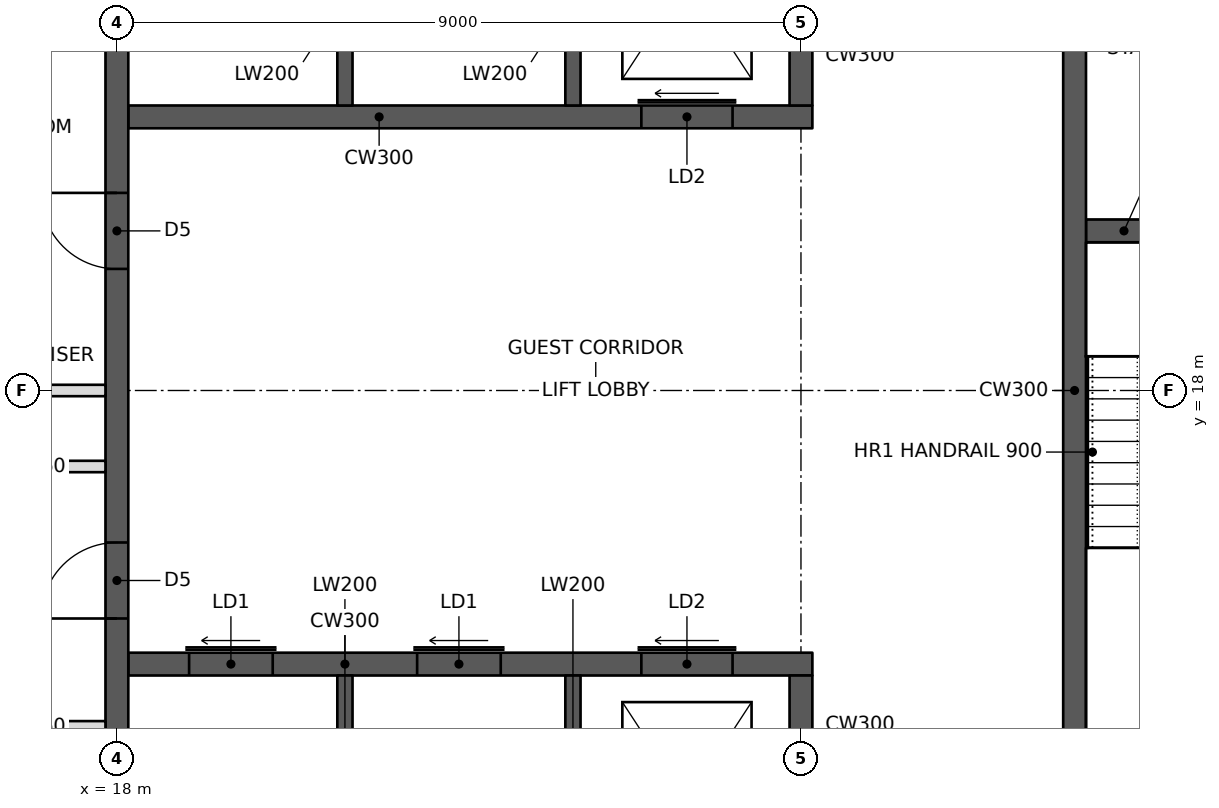
"""IFC4 building model, lengths in metres.
Left out: names, types, materials, properties, quantities, classifications, styles, units other than length and angle.
Written with IfcOpenShell. Run it as: python <this file> out.ifc"""

import sys

from ifc_helpers import new_model, si_unit, direction, frame, frame_2d, origin, place, context, subcontext, project, spatial, rectangle, extrude, element, fill, save


model = new_model("IFC4")
c1 = context("Model", 3, precision=1e-05, world=origin(), true_north=direction((0.0, 1.0)))
c2 = subcontext(c1, "Body", "Model", "MODEL_VIEW")
j1 = project(units=[si_unit("LENGTHUNIT", "METRE"), si_unit("PLANEANGLEUNIT", "RADIAN")], contexts=[c1])
p1 = place(None, origin())
s1 = spatial("IfcSite", under=j1, at=p1, CompositionType="ELEMENT")
p2 = place(p1, origin())
s2 = spatial("IfcBuilding", under=s1, at=p2, CompositionType="ELEMENT")
p3 = place(p2, frame((0.0, 0.0, 148.6)))
s3 = spatial("IfcBuildingStorey", under=s2, at=p3, CompositionType="ELEMENT", Elevation=148.6)
p4 = place(p3, frame((18.0, 11.4, 0.0), z_axis=(0.0, 0.0, 1.0), x_axis=(0.0, 1.0, 0.0)))
e1 = element("IfcWall", 1, at=p4, inside=s3, PredefinedType="SHEAR", context=c2, shape_type="SweptSolid", body=[
    extrude(rectangle(XDim=13.2, YDim=0.3, at=frame_2d((6.6, 0.0))), origin(), (0.0, 0.0, 1.0), 3.4),
])
p5 = place(p4, frame((3.6, 0.0, 0.0)))
e2 = element("IfcOpeningElement", 2, at=p5, cuts=e1, PredefinedType="OPENING", context=c2, shape_type="SweptSolid", body=[
    extrude(rectangle(XDim=1.0, YDim=2.1, at=frame_2d((0.5, 1.05))), frame((0.0, 0.16, 0.0), z_axis=(0.0, -1.0, 0.0), x_axis=(1.0, 0.0, 0.0)), (0.0, 0.0, 1.0), 0.32),
])
p6 = place(p4, frame((8.2, 0.0, 0.0)))
e3 = element("IfcOpeningElement", 3, at=p6, cuts=e1, PredefinedType="OPENING", context=c2, shape_type="SweptSolid", body=[
    extrude(rectangle(XDim=1.0, YDim=2.1, at=frame_2d((0.5, 1.05))), frame((0.0, 0.16, 0.0), z_axis=(0.0, -1.0, 0.0), x_axis=(1.0, 0.0, 0.0)), (0.0, 0.0, 1.0), 0.32),
])
p7 = place(p3, frame((14.55, 18.0, 0.0), z_axis=(0.0, 0.0, 1.0), x_axis=(1.0, 0.0, 0.0)))
e4 = element("IfcWall", 4, at=p7, inside=s3, PredefinedType="PARTITIONING", context=c2, shape_type="SweptSolid", body=[
    extrude(rectangle(XDim=3.3, YDim=0.15, at=frame_2d((1.65, 0.0))), origin(), (0.0, 0.0, 1.0), 3.2),
])
p8 = place(p3, frame((18.15, 14.4, 0.0), z_axis=(0.0, 0.0, 1.0), x_axis=(1.0, 0.0, 0.0)))
e5 = element("IfcWall", 5, at=p8, inside=s3, PredefinedType="SHEAR", context=c2, shape_type="SweptSolid", body=[
    extrude(rectangle(XDim=9.0, YDim=0.3, at=frame_2d((4.5, 0.0))), origin(), (0.0, 0.0, 1.0), 3.4),
])
p9 = place(p8, frame((0.8, 0.0, 0.0)))
e6 = element("IfcOpeningElement", 6, at=p9, cuts=e5, PredefinedType="OPENING", context=c2, shape_type="SweptSolid", body=[
    extrude(rectangle(XDim=1.1, YDim=2.1, at=frame_2d((0.55, 1.05))), frame((0.0, 0.16, 0.0), z_axis=(0.0, -1.0, 0.0), x_axis=(1.0, 0.0, 0.0)), (0.0, 0.0, 1.0), 0.32),
])
p10 = place(p8, frame((3.8, 0.0, 0.0)))
e7 = element("IfcOpeningElement", 7, at=p10, cuts=e5, PredefinedType="OPENING", context=c2, shape_type="SweptSolid", body=[
    extrude(rectangle(XDim=1.1, YDim=2.1, at=frame_2d((0.55, 1.05))), frame((0.0, 0.16, 0.0), z_axis=(0.0, -1.0, 0.0), x_axis=(1.0, 0.0, 0.0)), (0.0, 0.0, 1.0), 0.32),
])
p11 = place(p8, frame((6.75, 0.0, 0.0)))
e8 = element("IfcOpeningElement", 8, at=p11, cuts=e5, PredefinedType="OPENING", context=c2, shape_type="SweptSolid", body=[
    extrude(rectangle(XDim=1.2, YDim=2.1, at=frame_2d((0.6, 1.05))), frame((0.0, 0.16, 0.0), z_axis=(0.0, -1.0, 0.0), x_axis=(1.0, 0.0, 0.0)), (0.0, 0.0, 1.0), 0.32),
])
p12 = place(p3, frame((27.0, 11.4, 0.0), z_axis=(0.0, 0.0, 1.0), x_axis=(0.0, 1.0, 0.0)))
e9 = element("IfcWall", 9, at=p12, inside=s3, PredefinedType="SHEAR", context=c2, shape_type="SweptSolid", body=[
    extrude(rectangle(XDim=2.85, YDim=0.3, at=frame_2d((1.425, 0.0))), origin(), (0.0, 0.0, 1.0), 3.4),
])
for number, where, z_axis, x_axis in (
    (10, (21.0, 11.4, 0.0), (0.0, 0.0, 1.0), (0.0, 1.0, 0.0)),
    (11, (24.0, 11.4, 0.0), (0.0, 0.0, 1.0), (0.0, 1.0, 0.0)),
):
    element("IfcWall", number, at=place(p3, frame(where, z_axis=z_axis, x_axis=x_axis)), inside=s3, PredefinedType="SHEAR", context=c2, shape_type="SweptSolid", body=[
        extrude(rectangle(XDim=2.85, YDim=0.2, at=frame_2d((1.425, 0.0))), origin(), (0.0, 0.0, 1.0), 3.4),
    ])
p13 = place(p3, frame((18.15, 21.6, 0.0), z_axis=(0.0, 0.0, 1.0), x_axis=(1.0, 0.0, 0.0)))
e12 = element("IfcWall", 12, at=p13, inside=s3, PredefinedType="SHEAR", context=c2, shape_type="SweptSolid", body=[
    extrude(rectangle(XDim=9.0, YDim=0.3, at=frame_2d((4.5, 0.0))), origin(), (0.0, 0.0, 1.0), 3.4),
])
p14 = place(p13, frame((6.75, 0.0, 0.0)))
e13 = element("IfcOpeningElement", 13, at=p14, cuts=e12, PredefinedType="OPENING", context=c2, shape_type="SweptSolid", body=[
    extrude(rectangle(XDim=1.2, YDim=2.1, at=frame_2d((0.6, 1.05))), frame((0.0, 0.16, 0.0), z_axis=(0.0, -1.0, 0.0), x_axis=(1.0, 0.0, 0.0)), (0.0, 0.0, 1.0), 0.32),
])
p15 = place(p3, frame((27.0, 21.75, 0.0), z_axis=(0.0, 0.0, 1.0), x_axis=(0.0, 1.0, 0.0)))
e14 = element("IfcWall", 14, at=p15, inside=s3, PredefinedType="SHEAR", context=c2, shape_type="SweptSolid", body=[
    extrude(rectangle(XDim=2.85, YDim=0.3, at=frame_2d((1.425, 0.0))), origin(), (0.0, 0.0, 1.0), 3.4),
])
for number, where, z_axis, x_axis in (
    (15, (21.0, 21.75, 0.0), (0.0, 0.0, 1.0), (0.0, 1.0, 0.0)),
    (16, (24.0, 21.75, 0.0), (0.0, 0.0, 1.0), (0.0, 1.0, 0.0)),
):
    element("IfcWall", number, at=place(p3, frame(where, z_axis=z_axis, x_axis=x_axis)), inside=s3, PredefinedType="SHEAR", context=c2, shape_type="SweptSolid", body=[
        extrude(rectangle(XDim=2.85, YDim=0.2, at=frame_2d((1.425, 0.0))), origin(), (0.0, 0.0, 1.0), 3.4),
    ])
p16 = place(p3, frame((30.6, 11.4, 0.0), z_axis=(0.0, 0.0, 1.0), x_axis=(0.0, 1.0, 0.0)))
e17 = element("IfcWall", 17, at=p16, inside=s3, PredefinedType="SHEAR", context=c2, shape_type="SweptSolid", body=[
    extrude(rectangle(XDim=13.2, YDim=0.3, at=frame_2d((6.6, 0.0))), origin(), (0.0, 0.0, 1.0), 3.4),
])
p17 = place(p3, frame((30.75, 20.1, 0.0), z_axis=(0.0, 0.0, 1.0), x_axis=(1.0, 0.0, 0.0)))
e18 = element("IfcWall", 18, at=p17, inside=s3, PredefinedType="SHEAR", context=c2, shape_type="SweptSolid", body=[
    extrude(rectangle(XDim=2.85, YDim=0.3, at=frame_2d((1.425, 0.0))), origin(), (0.0, 0.0, 1.0), 3.4),
])
p18 = place(p17, frame((1.15, 0.0, 0.0)))
e19 = element("IfcOpeningElement", 19, at=p18, cuts=e18, PredefinedType="OPENING", context=c2, shape_type="SweptSolid", body=[
    extrude(rectangle(XDim=1.0, YDim=2.1, at=frame_2d((0.5, 1.05))), frame((0.0, 0.16, 0.0), z_axis=(0.0, -1.0, 0.0), x_axis=(1.0, 0.0, 0.0)), (0.0, 0.0, 1.0), 0.32),
])
p19 = place(p3, frame((14.55, 17.0, 0.0), z_axis=(0.0, 0.0, 1.0), x_axis=(1.0, 0.0, 0.0)))
e20 = element("IfcWall", 20, at=p19, inside=s3, PredefinedType="PARTITIONING", context=c2, shape_type="SweptSolid", body=[
    extrude(rectangle(XDim=3.3, YDim=0.15, at=frame_2d((1.65, 0.0))), origin(), (0.0, 0.0, 1.0), 3.2),
])
p20 = place(p19, frame((0.3, 0.0, 0.0)))
e21 = element("IfcOpeningElement", 21, at=p20, cuts=e20, PredefinedType="OPENING", context=c2, shape_type="SweptSolid", body=[
    extrude(rectangle(XDim=1.0, YDim=2.1, at=frame_2d((0.5, 1.05))), frame((0.0, 0.085, 0.0), z_axis=(0.0, -1.0, 0.0), x_axis=(1.0, 0.0, 0.0)), (0.0, 0.0, 1.0), 0.17),
])
p21 = place(p3, frame((14.55, 13.575, 0.0), z_axis=(0.0, 0.0, 1.0), x_axis=(1.0, 0.0, 0.0)))
e22 = element("IfcWall", 22, at=p21, inside=s3, PredefinedType="PARTITIONING", context=c2, shape_type="SweptSolid", body=[
    extrude(rectangle(XDim=3.3, YDim=0.15, at=frame_2d((1.65, 0.0))), origin(), (0.0, 0.0, 1.0), 3.2),
])
p22 = place(p21, frame((0.3, 0.0, 0.0)))
e23 = element("IfcOpeningElement", 23, at=p22, cuts=e22, PredefinedType="OPENING", context=c2, shape_type="SweptSolid", body=[
    extrude(rectangle(XDim=1.0, YDim=2.1, at=frame_2d((0.5, 1.05))), frame((0.0, 0.085, 0.0), z_axis=(0.0, -1.0, 0.0), x_axis=(1.0, 0.0, 0.0)), (0.0, 0.0, 1.0), 0.17),
])
p23 = place(p5, origin())
e24 = element("IfcDoor", 24, at=p23, inside=s3, OperationType="SINGLE_SWING_LEFT", PredefinedType="DOOR", context=c2, shape_type="SweptSolid", body=[
    extrude(rectangle(XDim=1.0, YDim=2.1, at=frame_2d((0.5, 1.05))), frame((0.0, 0.025, 0.0), z_axis=(0.0, -1.0, 0.0), x_axis=(1.0, 0.0, 0.0)), (0.0, 0.0, 1.0), 0.05),
])
fill(e2, e24)
p24 = place(p6, origin())
e25 = element("IfcDoor", 25, at=p24, inside=s3, OperationType="SINGLE_SWING_RIGHT", PredefinedType="DOOR", context=c2, shape_type="SweptSolid", body=[
    extrude(rectangle(XDim=1.0, YDim=2.1, at=frame_2d((0.5, 1.05))), frame((0.0, 0.025, 0.0), z_axis=(0.0, -1.0, 0.0), x_axis=(1.0, 0.0, 0.0)), (0.0, 0.0, 1.0), 0.05),
])
fill(e3, e25)
p25 = place(p9, origin())
e26 = element("IfcDoor", 26, at=p25, inside=s3, OperationType="SLIDING_TO_LEFT", PredefinedType="DOOR", context=c2, shape_type="SweptSolid", body=[
    extrude(rectangle(XDim=1.1, YDim=2.1, at=frame_2d((0.55, 1.05))), frame((0.0, 0.025, 0.0), z_axis=(0.0, -1.0, 0.0), x_axis=(1.0, 0.0, 0.0)), (0.0, 0.0, 1.0), 0.05),
])
fill(e6, e26)
p26 = place(p10, origin())
e27 = element("IfcDoor", 27, at=p26, inside=s3, OperationType="SLIDING_TO_LEFT", PredefinedType="DOOR", context=c2, shape_type="SweptSolid", body=[
    extrude(rectangle(XDim=1.1, YDim=2.1, at=frame_2d((0.55, 1.05))), frame((0.0, 0.025, 0.0), z_axis=(0.0, -1.0, 0.0), x_axis=(1.0, 0.0, 0.0)), (0.0, 0.0, 1.0), 0.05),
])
fill(e7, e27)
p27 = place(p11, origin())
e28 = element("IfcDoor", 28, at=p27, inside=s3, OperationType="SLIDING_TO_LEFT", PredefinedType="DOOR", context=c2, shape_type="SweptSolid", body=[
    extrude(rectangle(XDim=1.2, YDim=2.1, at=frame_2d((0.6, 1.05))), frame((0.0, 0.025, 0.0), z_axis=(0.0, -1.0, 0.0), x_axis=(1.0, 0.0, 0.0)), (0.0, 0.0, 1.0), 0.05),
])
fill(e8, e28)
p28 = place(p14, origin())
e29 = element("IfcDoor", 29, at=p28, inside=s3, OperationType="SLIDING_TO_LEFT", PredefinedType="DOOR", context=c2, shape_type="SweptSolid", body=[
    extrude(rectangle(XDim=1.2, YDim=2.1, at=frame_2d((0.6, 1.05))), frame((0.0, 0.025, 0.0), z_axis=(0.0, -1.0, 0.0), x_axis=(1.0, 0.0, 0.0)), (0.0, 0.0, 1.0), 0.05),
])
fill(e13, e29)
save(model, sys.argv[1])
